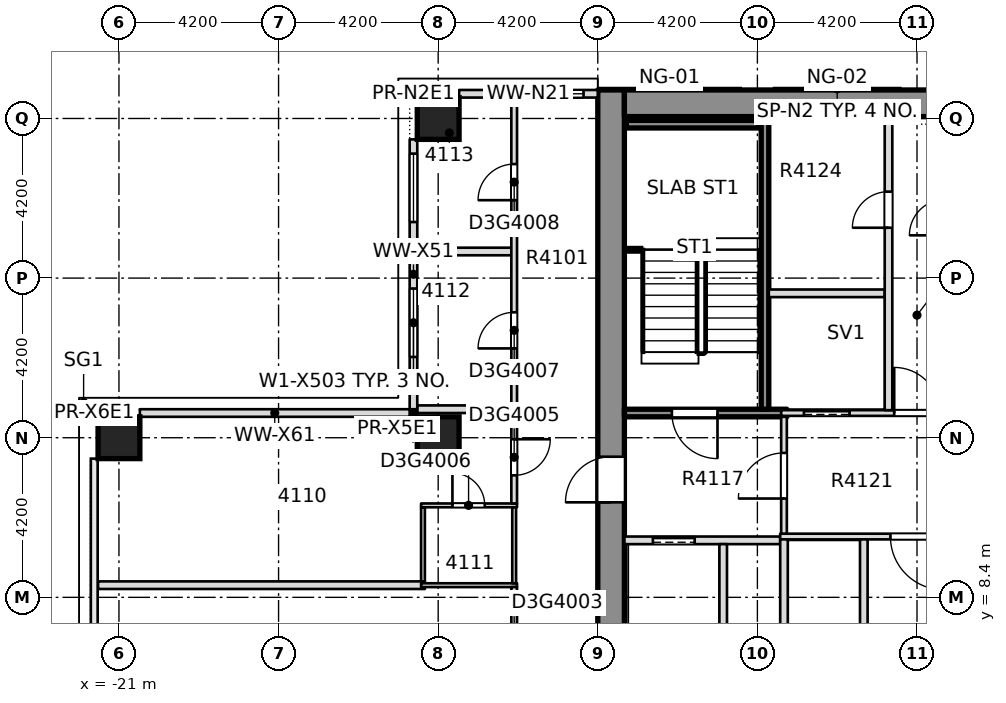
"""IFC4 building model, lengths in metres.
Left out: names, types, materials, properties, quantities, classifications, styles, units other than length and angle.
Written with IfcOpenShell. Run it as: python <this file> out.ifc"""

import sys

from ifc_helpers import new_model, si_unit, direction, frame, frame_2d, origin, origin_2d, place, context, subcontext, project, spatial, rectangle, extrude, element, fill, save


model = new_model("IFC4")
c1 = context("Model", 3, precision=1e-05, world=origin(), true_north=direction((0.0, 1.0)))
c2 = subcontext(c1, "Body", "Model", "MODEL_VIEW")
j1 = project(units=[si_unit("LENGTHUNIT", "METRE"), si_unit("PLANEANGLEUNIT", "RADIAN")], contexts=[c1])
p1 = place(None, origin())
s1 = spatial("IfcSite", under=j1, at=p1, CompositionType="ELEMENT")
p2 = place(p1, origin())
s2 = spatial("IfcBuilding", under=s1, at=p2, CompositionType="ELEMENT")
p3 = place(p2, frame((0.0, 0.0, 160.7)))
s3 = spatial("IfcBuildingStorey", under=s2, at=p3, CompositionType="ELEMENT", Elevation=160.7)
p4 = place(p3, frame((-8.05, -8.4, -0.4), z_axis=(0.0, 0.0, 1.0), x_axis=(0.0, 1.0, 0.0)))
e1 = element("IfcWall", 1, at=p4, inside=s3, PredefinedType="SOLIDWALL", context=c2, shape_type="SweptSolid", body=[
    extrude(rectangle(XDim=30.15, YDim=0.7, at=frame_2d((15.075, 0.0))), origin(), (0.0, 0.0, 1.0), 3.45),
])
p5 = place(p4, frame((19.3, 0.0, 0.4)))
e2 = element("IfcOpeningElement", 2, at=p5, cuts=e1, PredefinedType="OPENING", context=c2, shape_type="SweptSolid", body=[
    extrude(rectangle(XDim=1.2, YDim=2.1, at=frame_2d((0.6, 1.05))), frame((0.0, 0.36, 0.0), z_axis=(0.0, -1.0, 0.0), x_axis=(1.0, 0.0, 0.0)), (0.0, 0.0, 1.0), 0.72),
])
p6 = place(p3, frame((-7.7, 21.4, -0.4), z_axis=(0.0, 0.0, 1.0), x_axis=(1.0, 0.0, 0.0)))
e3 = element("IfcWall", 3, at=p6, inside=s3, PredefinedType="SHEAR", context=c2, shape_type="SweptSolid", body=[
    extrude(rectangle(XDim=15.4, YDim=0.7, at=frame_2d((7.7, 0.0))), origin(), (0.0, 0.0, 1.0), 3.45),
])
for number, where, z_axis, x_axis in (
    (4, (-21.0, 12.6, -0.4), (0.0, 0.0, 1.0), (1.0, 0.0, 0.0)),
    (5, (-12.6, 12.6, -0.4), (0.0, 0.0, 1.0), (1.0, 0.0, 0.0)),
    (6, (-12.6, 21.0, -0.4), (0.0, 0.0, 1.0), (1.0, 0.0, 0.0)),
):
    element("IfcColumn", number, at=place(p3, frame(where, z_axis=z_axis, x_axis=x_axis)), inside=s3, PredefinedType="COLUMN", context=c2, shape_type="SweptSolid", body=[
        extrude(rectangle(XDim=1.1, YDim=1.1, at=origin_2d()), origin(), (0.0, 0.0, 1.0), 3.45),
    ])
p7 = place(p3, frame((-21.55, 8.72, 0.0), z_axis=(0.0, 0.0, 1.0), x_axis=(1.0, 0.0, 0.0)))
e7 = element("IfcWall", 7, at=p7, inside=s3, PredefinedType="PARTITIONING", context=c2, shape_type="SweptSolid", body=[
    extrude(rectangle(XDim=8.6, YDim=0.2, at=frame_2d((4.3, 0.0))), origin(), (0.0, 0.0, 1.0), 3.05),
])
p8 = place(p3, frame((-13.05, 8.72, 0.0), z_axis=(0.0, 0.0, 1.0), x_axis=(1.0, 0.0, 0.0)))
e8 = element("IfcWall", 8, at=p8, inside=s3, PredefinedType="PARTITIONING", context=c2, shape_type="SweptSolid", body=[
    extrude(rectangle(XDim=2.525, YDim=0.1, at=frame_2d((1.263, 0.0))), origin(), (0.0, 0.0, 1.0), 3.05),
])
p9 = place(p3, frame((-13.05, 10.82, 0.0), z_axis=(0.0, 0.0, 1.0), x_axis=(1.0, 0.0, 0.0)))
e9 = element("IfcWall", 9, at=p9, inside=s3, PredefinedType="PARTITIONING", context=c2, shape_type="SweptSolid", body=[
    extrude(rectangle(XDim=2.525, YDim=0.1, at=frame_2d((1.263, 0.0))), origin(), (0.0, 0.0, 1.0), 3.05),
])
p10 = place(p9, frame((0.825, 0.0, 0.0)))
e10 = element("IfcOpeningElement", 10, at=p10, cuts=e9, PredefinedType="OPENING", context=c2, shape_type="SweptSolid", body=[
    extrude(rectangle(XDim=0.85, YDim=2.1, at=frame_2d((0.425, 1.05))), frame((0.0, 0.06, 0.0), z_axis=(0.0, -1.0, 0.0), x_axis=(1.0, 0.0, 0.0)), (0.0, 0.0, 1.0), 0.12),
])
for number, where, z_axis, x_axis in (
    (11, (-13.15, 13.35, 0.0), (0.0, 0.0, 1.0), (1.0, 0.0, 0.0)),
    (12, (-13.15, 17.5, 0.0), (0.0, 0.0, 1.0), (1.0, 0.0, 0.0)),
):
    element("IfcWall", number, at=place(p3, frame(where, z_axis=z_axis, x_axis=x_axis)), inside=s3, PredefinedType="PARTITIONING", context=c2, shape_type="SweptSolid", body=[
        extrude(rectangle(XDim=2.475, YDim=0.2, at=frame_2d((1.237, 0.0))), origin(), (0.0, 0.0, 1.0), 3.05),
    ])
p11 = place(p3, frame((-13.0, 8.82, 0.0), z_axis=(0.0, 0.0, 1.0), x_axis=(0.0, 1.0, 0.0)))
e13 = element("IfcWall", 13, at=p11, inside=s3, PredefinedType="PARTITIONING", context=c2, shape_type="SweptSolid", body=[
    extrude(rectangle(XDim=1.95, YDim=0.1, at=frame_2d((0.975, 0.0))), origin(), (0.0, 0.0, 1.0), 3.05),
])
p12 = place(p3, frame((-10.6, 5.55, 0.0), z_axis=(0.0, 0.0, 1.0), x_axis=(0.0, 1.0, 0.0)))
e14 = element("IfcWall", 14, at=p12, inside=s3, PredefinedType="PARTITIONING", context=c2, shape_type="SweptSolid", body=[
    extrude(rectangle(XDim=3.12, YDim=0.15, at=frame_2d((1.56, 0.0))), origin(), (0.0, 0.0, 1.0), 3.05),
])
p13 = place(p12, frame((1.085, 0.0, 0.0)))
e15 = element("IfcOpeningElement", 15, at=p13, cuts=e14, PredefinedType="OPENING", context=c2, shape_type="SweptSolid", body=[
    extrude(rectangle(XDim=0.95, YDim=2.1, at=frame_2d((0.475, 1.05))), frame((0.0, 0.085, 0.0), z_axis=(0.0, -1.0, 0.0), x_axis=(1.0, 0.0, 0.0)), (0.0, 0.0, 1.0), 0.17),
])
p14 = place(p3, frame((-10.6, 8.77, 0.0), z_axis=(0.0, 0.0, 1.0), x_axis=(0.0, 1.0, 0.0)))
e16 = element("IfcWall", 16, at=p14, inside=s3, PredefinedType="PARTITIONING", context=c2, shape_type="SweptSolid", body=[
    extrude(rectangle(XDim=2.0, YDim=0.1, at=frame_2d((1.0, 0.0))), origin(), (0.0, 0.0, 1.0), 3.05),
])
p15 = place(p3, frame((-10.6, 10.87, 0.0), z_axis=(0.0, 0.0, 1.0), x_axis=(0.0, 1.0, 0.0)))
e17 = element("IfcWall", 17, at=p15, inside=s3, PredefinedType="PARTITIONING", context=c2, shape_type="SweptSolid", body=[
    extrude(rectangle(XDim=10.68, YDim=0.15, at=frame_2d((5.34, 0.0))), origin(), (0.0, 0.0, 1.0), 3.05),
])
p16 = place(p15, frame((0.74, 0.0, 0.0)))
e18 = element("IfcOpeningElement", 18, at=p16, cuts=e17, PredefinedType="OPENING", context=c2, shape_type="SweptSolid", body=[
    extrude(rectangle(XDim=0.95, YDim=2.1, at=frame_2d((0.475, 1.05))), frame((0.0, 0.085, 0.0), z_axis=(0.0, -1.0, 0.0), x_axis=(1.0, 0.0, 0.0)), (0.0, 0.0, 1.0), 0.17),
])
p17 = place(p15, frame((4.08, 0.0, 0.0)))
e19 = element("IfcOpeningElement", 19, at=p17, cuts=e17, PredefinedType="OPENING", context=c2, shape_type="SweptSolid", body=[
    extrude(rectangle(XDim=0.95, YDim=2.1, at=frame_2d((0.475, 1.05))), frame((0.0, 0.085, 0.0), z_axis=(0.0, -1.0, 0.0), x_axis=(1.0, 0.0, 0.0)), (0.0, 0.0, 1.0), 0.17),
])
p18 = place(p15, frame((7.98, 0.0, 0.0)))
e20 = element("IfcOpeningElement", 20, at=p18, cuts=e17, PredefinedType="OPENING", context=c2, shape_type="SweptSolid", body=[
    extrude(rectangle(XDim=0.95, YDim=2.1, at=frame_2d((0.475, 1.05))), frame((0.0, 0.085, 0.0), z_axis=(0.0, -1.0, 0.0), x_axis=(1.0, 0.0, 0.0)), (0.0, 0.0, 1.0), 0.17),
])
p19 = place(p3, frame((-8.4, 21.65, 0.0), z_axis=(0.0, 0.0, 1.0), x_axis=(-1.0, 0.0, 0.0)))
e21 = element("IfcWall", 21, at=p19, inside=s3, PredefinedType="STANDARD", context=c2, shape_type="SweptSolid", body=[
    extrude(rectangle(XDim=3.65, YDim=0.2, at=frame_2d((1.825, 0.0))), origin(), (0.0, 0.0, 1.0), 3.05),
])
p20 = place(p19, frame((0.375, 0.0, 0.2)))
e22 = element("IfcOpeningElement", 22, at=p20, cuts=e21, PredefinedType="OPENING", context=c2, shape_type="SweptSolid", body=[
    extrude(rectangle(XDim=1.8, YDim=2.65, at=frame_2d((0.9, 1.325))), frame((0.0, 0.11, 0.0), z_axis=(0.0, -1.0, 0.0), x_axis=(1.0, 0.0, 0.0)), (0.0, 0.0, 1.0), 0.22),
])
p21 = place(p3, frame((-13.25, 20.45, 0.0), z_axis=(0.0, 0.0, 1.0), x_axis=(0.0, -1.0, 0.0)))
e23 = element("IfcWall", 23, at=p21, inside=s3, PredefinedType="STANDARD", context=c2, shape_type="SweptSolid", body=[
    extrude(rectangle(XDim=7.1, YDim=0.2, at=frame_2d((3.55, 0.0))), origin(), (0.0, 0.0, 1.0), 3.05),
])
p22 = place(p21, frame((3.925, 0.0, 0.2)))
e24 = element("IfcOpeningElement", 24, at=p22, cuts=e23, PredefinedType="OPENING", context=c2, shape_type="SweptSolid", body=[
    extrude(rectangle(XDim=1.8, YDim=2.65, at=frame_2d((0.9, 1.325))), frame((0.0, 0.11, 0.0), z_axis=(0.0, -1.0, 0.0), x_axis=(1.0, 0.0, 0.0)), (0.0, 0.0, 1.0), 0.22),
])
p23 = place(p21, frame((0.375, 0.0, 0.2)))
e25 = element("IfcOpeningElement", 25, at=p23, cuts=e23, PredefinedType="OPENING", context=c2, shape_type="SweptSolid", body=[
    extrude(rectangle(XDim=1.8, YDim=2.65, at=frame_2d((0.9, 1.325))), frame((0.0, 0.11, 0.0), z_axis=(0.0, -1.0, 0.0), x_axis=(1.0, 0.0, 0.0)), (0.0, 0.0, 1.0), 0.22),
])
p24 = place(p3, frame((-13.35, 13.25, 0.0), z_axis=(0.0, 0.0, 1.0), x_axis=(-1.0, 0.0, 0.0)))
e26 = element("IfcWall", 26, at=p24, inside=s3, PredefinedType="STANDARD", context=c2, shape_type="SweptSolid", body=[
    extrude(rectangle(XDim=7.1, YDim=0.2, at=frame_2d((3.55, 0.0))), origin(), (0.0, 0.0, 1.0), 3.05),
])
p25 = place(p3, frame((-7.699, 9.9, 0.0), z_axis=(0.0, 0.0, 1.0), x_axis=(1.0, 0.0, 0.0)))
e27 = element("IfcWall", 27, at=p25, inside=s3, PredefinedType="PARTITIONING", context=c2, shape_type="SweptSolid", body=[
    extrude(rectangle(XDim=4.099, YDim=0.2, at=frame_2d((2.049, 0.0))), origin(), (0.0, 0.0, 1.0), 3.05),
])
p26 = place(p25, frame((0.749, 0.0, 0.0)))
e28 = element("IfcOpeningElement", 28, at=p26, cuts=e27, PredefinedType="OPENING", context=c2, shape_type="SweptSolid", body=[
    extrude(rectangle(XDim=1.1, YDim=2.1, at=frame_2d((0.55, 1.05))), frame((0.0, 0.11, 0.0), z_axis=(0.0, -1.0, 0.0), x_axis=(1.0, 0.0, 0.0)), (0.0, 0.0, 1.0), 0.22),
])
p27 = place(p3, frame((-3.6, 10.0, 0.0), z_axis=(0.0, 0.0, 1.0), x_axis=(1.0, 0.0, 0.0)))
e29 = element("IfcWall", 29, at=p27, inside=s3, PredefinedType="PARTITIONING", context=c2, shape_type="SweptSolid", body=[
    extrude(rectangle(XDim=7.2, YDim=0.15, at=frame_2d((3.6, 0.0))), origin(), (0.0, 0.0, 1.0), 3.05),
])
p28 = place(p27, frame((2.9, 0.0, 0.0)))
e30 = element("IfcOpeningElement", 30, at=p28, cuts=e29, PredefinedType="OPENING", context=c2, shape_type="SweptSolid", body=[
    extrude(rectangle(XDim=1.4, YDim=2.1, at=frame_2d((0.7, 1.05))), frame((0.0, 0.085, 0.0), z_axis=(0.0, -1.0, 0.0), x_axis=(1.0, 0.0, 0.0)), (0.0, 0.0, 1.0), 0.17),
])
p29 = place(p3, frame((-7.699, 13.25, 0.0), z_axis=(0.0, 0.0, 1.0), x_axis=(1.0, 0.0, 0.0)))
e31 = element("IfcWall", 31, at=p29, inside=s3, PredefinedType="SOLIDWALL", context=c2, shape_type="SweptSolid", body=[
    extrude(rectangle(XDim=4.274, YDim=0.2, at=frame_2d((2.137, 0.0))), origin(), (0.0, 0.0, 1.0), 3.05),
])
p30 = place(p29, frame((1.249, 0.0, 0.0)))
e32 = element("IfcOpeningElement", 32, at=p30, cuts=e31, PredefinedType="OPENING", context=c2, shape_type="SweptSolid", body=[
    extrude(rectangle(XDim=1.2, YDim=2.1, at=frame_2d((0.6, 1.05))), frame((0.0, 0.11, 0.0), z_axis=(0.0, -1.0, 0.0), x_axis=(1.0, 0.0, 0.0)), (0.0, 0.0, 1.0), 0.22),
])
p31 = place(p3, frame((-3.575, 13.25, 0.0), z_axis=(0.0, 0.0, 1.0), x_axis=(1.0, 0.0, 0.0)))
e33 = element("IfcWall", 33, at=p31, inside=s3, PredefinedType="PARTITIONING", context=c2, shape_type="SweptSolid", body=[
    extrude(rectangle(XDim=7.15, YDim=0.15, at=frame_2d((3.575, 0.0))), origin(), (0.0, 0.0, 1.0), 3.05),
])
p32 = place(p31, frame((0.6, 0.0, 0.0)))
e34 = element("IfcOpeningElement", 34, at=p32, cuts=e33, PredefinedType="OPENING", context=c2, shape_type="SweptSolid", body=[
    extrude(rectangle(XDim=1.2, YDim=2.1, at=frame_2d((0.6, 1.05))), frame((0.0, 0.085, 0.0), z_axis=(0.0, -1.0, 0.0), x_axis=(1.0, 0.0, 0.0)), (0.0, 0.0, 1.0), 0.17),
])
p33 = place(p31, frame((5.4, 0.0, 0.0)))
e35 = element("IfcOpeningElement", 35, at=p33, cuts=e33, PredefinedType="OPENING", context=c2, shape_type="SweptSolid", body=[
    extrude(rectangle(XDim=1.1, YDim=2.1, at=frame_2d((0.55, 1.05))), frame((0.0, 0.085, 0.0), z_axis=(0.0, -1.0, 0.0), x_axis=(1.0, 0.0, 0.0)), (0.0, 0.0, 1.0), 0.17),
])
p34 = place(p31, frame((2.975, 0.0, 0.0)))
e36 = element("IfcOpeningElement", 36, at=p34, cuts=e33, PredefinedType="OPENING", context=c2, shape_type="SweptSolid", body=[
    extrude(rectangle(XDim=1.2, YDim=2.1, at=frame_2d((0.6, 1.05))), frame((0.0, 0.085, 0.0), z_axis=(0.0, -1.0, 0.0), x_axis=(1.0, 0.0, 0.0)), (0.0, 0.0, 1.0), 0.17),
])
p35 = place(p3, frame((-3.9, 16.4, 0.0), z_axis=(0.0, 0.0, 1.0), x_axis=(1.0, 0.0, 0.0)))
e37 = element("IfcWall", 37, at=p35, inside=s3, PredefinedType="PARTITIONING", context=c2, shape_type="SweptSolid", body=[
    extrude(rectangle(XDim=3.05, YDim=0.2, at=frame_2d((1.525, 0.0))), origin(), (0.0, 0.0, 1.0), 3.05),
])
p36 = place(p3, frame((-5.1, 7.075, 0.0), z_axis=(0.0, 0.0, 1.0), x_axis=(0.0, 1.0, 0.0)))
e38 = element("IfcWall", 38, at=p36, inside=s3, PredefinedType="PARTITIONING", context=c2, shape_type="SweptSolid", body=[
    extrude(rectangle(XDim=2.725, YDim=0.2, at=frame_2d((1.363, 0.0))), origin(), (0.0, 0.0, 1.0), 3.05),
])
p37 = place(p3, frame((-4.0, 13.35, 0.0), z_axis=(0.0, 0.0, 1.0), x_axis=(0.0, 1.0, 0.0)))
e39 = element("IfcWall", 39, at=p37, inside=s3, PredefinedType="SOLIDWALL", context=c2, shape_type="SweptSolid", body=[
    extrude(rectangle(XDim=7.699, YDim=0.2, at=frame_2d((3.85, 0.0))), origin(), (0.0, 0.0, 1.0), 3.05),
])
p38 = place(p3, frame((-3.5, 7.075, 0.0), z_axis=(0.0, 0.0, 1.0), x_axis=(0.0, 1.0, 0.0)))
e40 = element("IfcWall", 40, at=p38, inside=s3, PredefinedType="PARTITIONING", context=c2, shape_type="SweptSolid", body=[
    extrude(rectangle(XDim=2.85, YDim=0.2, at=frame_2d((1.425, 0.0))), origin(), (0.0, 0.0, 1.0), 3.05),
])
p39 = place(p3, frame((-3.5, 10.075, 0.0), z_axis=(0.0, 0.0, 1.0), x_axis=(0.0, 1.0, 0.0)))
e41 = element("IfcWall", 41, at=p39, inside=s3, PredefinedType="PARTITIONING", context=c2, shape_type="SweptSolid", body=[
    extrude(rectangle(XDim=3.075, YDim=0.15, at=frame_2d((1.538, 0.0))), origin(), (0.0, 0.0, 1.0), 3.05),
])
p40 = place(p39, frame((0.925, 0.0, 0.0)))
e42 = element("IfcOpeningElement", 42, at=p40, cuts=e41, PredefinedType="OPENING", context=c2, shape_type="SweptSolid", body=[
    extrude(rectangle(XDim=1.2, YDim=2.1, at=frame_2d((0.6, 1.05))), frame((0.0, 0.085, 0.0), z_axis=(0.0, -1.0, 0.0), x_axis=(1.0, 0.0, 0.0)), (0.0, 0.0, 1.0), 0.17),
])
p41 = place(p3, frame((-1.4, 7.075, 0.0), z_axis=(0.0, 0.0, 1.0), x_axis=(0.0, 1.0, 0.0)))
e43 = element("IfcWall", 43, at=p41, inside=s3, PredefinedType="PARTITIONING", context=c2, shape_type="SweptSolid", body=[
    extrude(rectangle(XDim=2.85, YDim=0.2, at=frame_2d((1.425, 0.0))), origin(), (0.0, 0.0, 1.0), 3.05),
])
p42 = place(p3, frame((-0.75, 13.325, 0.0), z_axis=(0.0, 0.0, 1.0), x_axis=(0.0, 1.0, 0.0)))
e44 = element("IfcWall", 44, at=p42, inside=s3, PredefinedType="PARTITIONING", context=c2, shape_type="SweptSolid", body=[
    extrude(rectangle(XDim=7.724, YDim=0.2, at=frame_2d((3.862, 0.0))), origin(), (0.0, 0.0, 1.0), 3.05),
])
p43 = place(p42, frame((4.8, 0.0, 0.0)))
e45 = element("IfcOpeningElement", 45, at=p43, cuts=e44, PredefinedType="OPENING", context=c2, shape_type="SweptSolid", body=[
    extrude(rectangle(XDim=0.95, YDim=2.1, at=frame_2d((0.475, 1.05))), frame((0.0, 0.11, 0.0), z_axis=(0.0, -1.0, 0.0), x_axis=(1.0, 0.0, 0.0)), (0.0, 0.0, 1.0), 0.22),
])
p44 = place(p3, frame((-7.65, 20.85, 0.0), z_axis=(0.0, 0.0, 1.0), x_axis=(1.0, 0.0, 0.0)))
e46 = element("IfcWall", 46, at=p44, inside=s3, PredefinedType="SOLIDWALL", context=c2, shape_type="SweptSolid", body=[
    extrude(rectangle(XDim=3.5, YDim=0.2, at=frame_2d((1.75, 0.0))), origin(), (0.0, 0.0, 1.0), 3.05),
])
p45 = place(p16, origin())
e47 = element("IfcDoor", 47, at=p45, inside=s3, OperationType="SINGLE_SWING_LEFT", PredefinedType="DOOR", context=c2, shape_type="SweptSolid", body=[
    extrude(rectangle(XDim=0.95, YDim=2.1, at=frame_2d((0.475, 1.05))), frame((0.0, 0.025, 0.0), z_axis=(0.0, -1.0, 0.0), x_axis=(1.0, 0.0, 0.0)), (0.0, 0.0, 1.0), 0.05),
])
fill(e18, e47)
p46 = place(p10, origin())
e48 = element("IfcDoor", 48, at=p46, inside=s3, OperationType="SINGLE_SWING_RIGHT", PredefinedType="DOOR", context=c2, shape_type="SweptSolid", body=[
    extrude(rectangle(XDim=0.85, YDim=2.1, at=frame_2d((0.425, 1.05))), frame((0.0, 0.025, 0.0), z_axis=(0.0, -1.0, 0.0), x_axis=(1.0, 0.0, 0.0)), (0.0, 0.0, 1.0), 0.05),
])
fill(e10, e48)
p47 = place(p17, origin())
e49 = element("IfcDoor", 49, at=p47, inside=s3, OperationType="SINGLE_SWING_LEFT", PredefinedType="DOOR", context=c2, shape_type="SweptSolid", body=[
    extrude(rectangle(XDim=0.95, YDim=2.1, at=frame_2d((0.475, 1.05))), frame((0.0, 0.025, 0.0), z_axis=(0.0, -1.0, 0.0), x_axis=(1.0, 0.0, 0.0)), (0.0, 0.0, 1.0), 0.05),
])
fill(e19, e49)
p48 = place(p18, origin())
e50 = element("IfcDoor", 50, at=p48, inside=s3, OperationType="SINGLE_SWING_RIGHT", PredefinedType="DOOR", context=c2, shape_type="SweptSolid", body=[
    extrude(rectangle(XDim=0.95, YDim=2.1, at=frame_2d((0.475, 1.05))), frame((0.0, 0.025, 0.0), z_axis=(0.0, -1.0, 0.0), x_axis=(1.0, 0.0, 0.0)), (0.0, 0.0, 1.0), 0.05),
])
fill(e20, e50)
p49 = place(p20, origin())
e51 = element("IfcWindow", 51, at=p49, inside=s3, PartitioningType="SINGLE_PANEL", PredefinedType="WINDOW", context=c2, shape_type="SweptSolid", body=[
    extrude(rectangle(XDim=1.8, YDim=2.65, at=frame_2d((0.9, 1.325))), frame((0.0, 0.03, 0.0), z_axis=(0.0, -1.0, 0.0), x_axis=(1.0, 0.0, 0.0)), (0.0, 0.0, 1.0), 0.06),
])
fill(e22, e51)
p50 = place(p22, origin())
e52 = element("IfcWindow", 52, at=p50, inside=s3, PartitioningType="SINGLE_PANEL", PredefinedType="WINDOW", context=c2, shape_type="SweptSolid", body=[
    extrude(rectangle(XDim=1.8, YDim=2.65, at=frame_2d((0.9, 1.325))), frame((0.0, 0.03, 0.0), z_axis=(0.0, -1.0, 0.0), x_axis=(1.0, 0.0, 0.0)), (0.0, 0.0, 1.0), 0.06),
])
fill(e24, e52)
p51 = place(p23, origin())
e53 = element("IfcWindow", 53, at=p51, inside=s3, PartitioningType="SINGLE_PANEL", PredefinedType="WINDOW", context=c2, shape_type="SweptSolid", body=[
    extrude(rectangle(XDim=1.8, YDim=2.65, at=frame_2d((0.9, 1.325))), frame((0.0, 0.03, 0.0), z_axis=(0.0, -1.0, 0.0), x_axis=(1.0, 0.0, 0.0)), (0.0, 0.0, 1.0), 0.06),
])
fill(e25, e53)
p52 = place(p30, origin())
e54 = element("IfcDoor", 54, at=p52, inside=s3, OperationType="SINGLE_SWING_LEFT", PredefinedType="DOOR", context=c2, shape_type="SweptSolid", body=[
    extrude(rectangle(XDim=1.2, YDim=2.1, at=frame_2d((0.6, 1.05))), frame((0.0, 0.025, 0.0), z_axis=(0.0, -1.0, 0.0), x_axis=(1.0, 0.0, 0.0)), (0.0, 0.0, 1.0), 0.05),
])
fill(e32, e54)
p53 = place(p26, origin())
e55 = element("IfcDoor", 55, at=p53, inside=s3, OperationType="SLIDING_TO_RIGHT", PredefinedType="DOOR", context=c2, shape_type="SweptSolid", body=[
    extrude(rectangle(XDim=1.1, YDim=2.1, at=frame_2d((0.55, 1.05))), frame((0.0, 0.025, 0.0), z_axis=(0.0, -1.0, 0.0), x_axis=(1.0, 0.0, 0.0)), (0.0, 0.0, 1.0), 0.05),
])
fill(e28, e55)
p54 = place(p28, origin())
e56 = element("IfcDoor", 56, at=p54, inside=s3, OperationType="SINGLE_SWING_RIGHT", PredefinedType="DOOR", context=c2, shape_type="SweptSolid", body=[
    extrude(rectangle(XDim=1.4, YDim=2.1, at=frame_2d((0.7, 1.05))), frame((0.0, 0.025, 0.0), z_axis=(0.0, -1.0, 0.0), x_axis=(1.0, 0.0, 0.0)), (0.0, 0.0, 1.0), 0.05),
])
fill(e30, e56)
p55 = place(p32, origin())
e57 = element("IfcDoor", 57, at=p55, inside=s3, OperationType="SLIDING_TO_RIGHT", PredefinedType="DOOR", context=c2, shape_type="SweptSolid", body=[
    extrude(rectangle(XDim=1.2, YDim=2.1, at=frame_2d((0.6, 1.05))), frame((0.0, 0.025, 0.0), z_axis=(0.0, -1.0, 0.0), x_axis=(1.0, 0.0, 0.0)), (0.0, 0.0, 1.0), 0.05),
])
fill(e34, e57)
p56 = place(p34, origin())
e58 = element("IfcDoor", 58, at=p56, inside=s3, OperationType="SINGLE_SWING_RIGHT", PredefinedType="DOOR", context=c2, shape_type="SweptSolid", body=[
    extrude(rectangle(XDim=1.2, YDim=2.1, at=frame_2d((0.6, 1.05))), frame((0.0, 0.025, 0.0), z_axis=(0.0, -1.0, 0.0), x_axis=(1.0, 0.0, 0.0)), (0.0, 0.0, 1.0), 0.05),
])
fill(e36, e58)
p57 = place(p43, origin())
e59 = element("IfcDoor", 59, at=p57, inside=s3, OperationType="SINGLE_SWING_RIGHT", PredefinedType="DOOR", context=c2, shape_type="SweptSolid", body=[
    extrude(rectangle(XDim=0.95, YDim=2.1, at=frame_2d((0.475, 1.05))), frame((0.0, 0.025, 0.0), z_axis=(0.0, -1.0, 0.0), x_axis=(1.0, 0.0, 0.0)), (0.0, 0.0, 1.0), 0.05),
])
fill(e45, e59)
p58 = place(p40, origin())
e60 = element("IfcDoor", 60, at=p58, inside=s3, OperationType="SINGLE_SWING_RIGHT", PredefinedType="DOOR", context=c2, shape_type="SweptSolid", body=[
    extrude(rectangle(XDim=1.2, YDim=2.1, at=frame_2d((0.6, 1.05))), frame((0.0, 0.025, 0.0), z_axis=(0.0, -1.0, 0.0), x_axis=(1.0, 0.0, 0.0)), (0.0, 0.0, 1.0), 0.05),
])
fill(e42, e60)
p59 = place(p5, origin())
e61 = element("IfcDoor", 61, at=p59, inside=s3, OperationType="SINGLE_SWING_LEFT", PredefinedType="DOOR", context=c2, shape_type="SweptSolid", body=[
    extrude(rectangle(XDim=1.2, YDim=2.1, at=frame_2d((0.6, 1.05))), frame((0.0, 0.025, 0.0), z_axis=(0.0, -1.0, 0.0), x_axis=(1.0, 0.0, 0.0)), (0.0, 0.0, 1.0), 0.05),
])
fill(e2, e61)
save(model, sys.argv[1])
